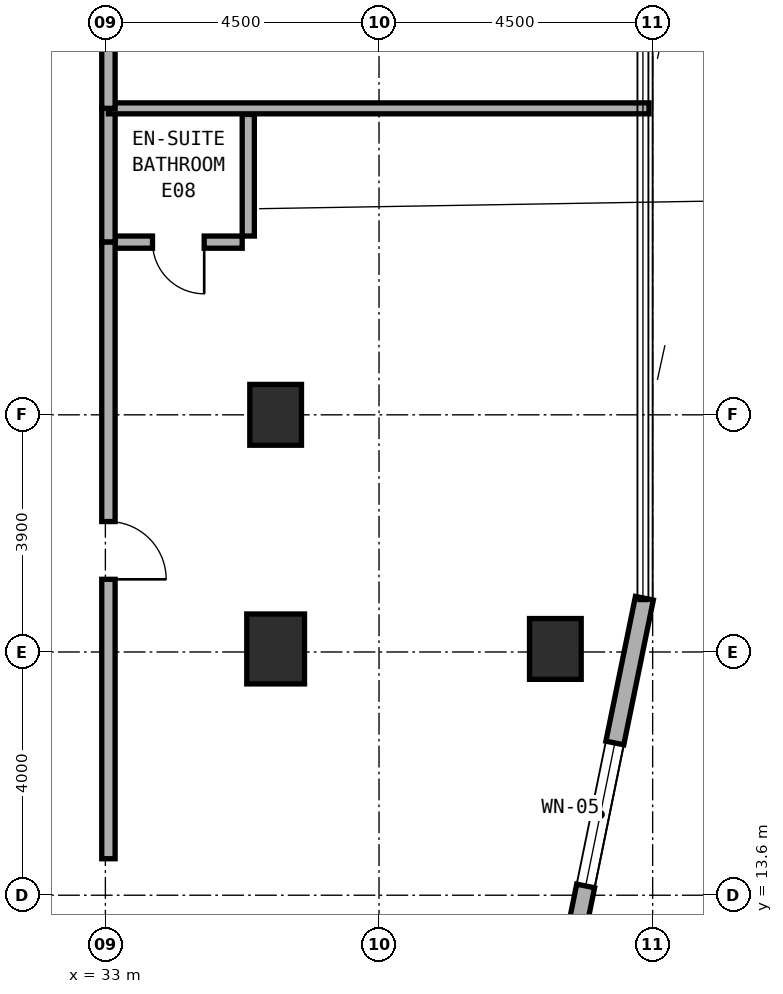
"""IFC4 building model, lengths in metres.
Left out: names, types, materials, properties, quantities, classifications, styles, units other than length and angle.
Written with IfcOpenShell. Run it as: python <this file> out.ifc"""

import sys

from ifc_helpers import new_model, si_unit, direction, frame, frame_2d, origin, origin_2d, place, context, subcontext, project, spatial, rectangle, extrude, element, fill, save


model = new_model("IFC4")
c1 = context("Model", 3, precision=1e-05, world=origin(), true_north=direction((0.0, 1.0)))
c2 = subcontext(c1, "Body", "Model", "MODEL_VIEW")
j1 = project(units=[si_unit("LENGTHUNIT", "METRE"), si_unit("PLANEANGLEUNIT", "RADIAN")], contexts=[c1])
p1 = place(None, origin())
s1 = spatial("IfcSite", under=j1, at=p1, CompositionType="ELEMENT")
p2 = place(p1, origin())
s2 = spatial("IfcBuilding", under=s1, at=p2, CompositionType="ELEMENT")
p3 = place(p2, frame((0.0, 0.0, 83.5)))
s3 = spatial("IfcBuildingStorey", under=s2, at=p3, CompositionType="ELEMENT", Elevation=83.5)
p4 = place(p3, frame((35.8, 21.5, 0.0), z_axis=(0.0, 0.0, 1.0), x_axis=(1.0, 0.0, 0.0)))
e1 = element("IfcColumn", 1, at=p4, inside=s3, PredefinedType="COLUMN", context=c2, shape_type="SweptSolid", body=[
    extrude(rectangle(XDim=0.85, YDim=1.0, at=origin_2d()), origin(), (0.0, 0.0, 1.0), 3.5),
])
p5 = place(p3, frame((35.8, 17.65, 0.0), z_axis=(0.0, 0.0, 1.0), x_axis=(1.0, 0.0, 0.0)))
e2 = element("IfcColumn", 2, at=p5, inside=s3, PredefinedType="COLUMN", context=c2, shape_type="SweptSolid", body=[
    extrude(rectangle(XDim=0.95, YDim=1.15, at=origin_2d()), origin(), (0.0, 0.0, 1.0), 3.5),
])
p6 = place(p3, frame((40.4, 17.65, 0.0), z_axis=(0.0, 0.0, 1.0), x_axis=(1.0, 0.0, 0.0)))
e3 = element("IfcColumn", 3, at=p6, inside=s3, PredefinedType="COLUMN", context=c2, shape_type="SweptSolid", body=[
    extrude(rectangle(XDim=0.85, YDim=1.0, at=origin_2d()), origin(), (0.0, 0.0, 1.0), 3.5),
])
p7 = place(p3, frame((39.851, 8.622, 0.0), z_axis=(0.0, 0.0, 1.0), x_axis=(0.199990901713, 0.979797754249, 0.0)))
e4 = element("IfcWall", 4, at=p7, inside=s3, PredefinedType="STANDARD", context=c2, shape_type="SweptSolid", body=[
    extrude(rectangle(XDim=10.065, YDim=0.3, at=frame_2d((5.033, 0.0))), origin(), (0.0, 0.0, 1.0), 3.22),
])
p8 = place(p7, frame((0.378, 0.0, 0.85)))
e5 = element("IfcOpeningElement", 5, at=p8, cuts=e4, PredefinedType="OPENING", context=c2, shape_type="SweptSolid", body=[
    extrude(rectangle(XDim=1.8, YDim=1.5, at=frame_2d((0.9, 0.75))), frame((0.0, 0.16, 0.0), z_axis=(0.0, -1.0, 0.0), x_axis=(1.0, 0.0, 0.0)), (0.0, 0.0, 1.0), 0.32),
])
p9 = place(p7, frame((5.236, 0.0, 0.8)))
e6 = element("IfcOpeningElement", 6, at=p9, cuts=e4, PredefinedType="OPENING", context=c2, shape_type="SweptSolid", body=[
    extrude(rectangle(XDim=2.4, YDim=1.6, at=frame_2d((1.2, 0.8))), frame((0.0, 0.16, 0.0), z_axis=(0.0, -1.0, 0.0), x_axis=(1.0, 0.0, 0.0)), (0.0, 0.0, 1.0), 0.32),
])
p10 = place(p3, frame((33.15, 24.34, 0.0), z_axis=(0.0, 0.0, 1.0), x_axis=(1.0, 0.0, 0.0)))
e7 = element("IfcWall", 7, at=p10, inside=s3, PredefinedType="PLUMBINGWALL", context=c2, shape_type="SweptSolid", body=[
    extrude(rectangle(XDim=2.1, YDim=0.2, at=frame_2d((1.05, 0.0))), origin(), (0.0, 0.0, 1.0), 3.22),
])
p11 = place(p10, frame((0.625, 0.0, 0.0)))
e8 = element("IfcOpeningElement", 8, at=p11, cuts=e7, PredefinedType="OPENING", context=c2, shape_type="SweptSolid", body=[
    extrude(rectangle(XDim=0.85, YDim=2.1, at=frame_2d((0.425, 1.05))), frame((0.0, 0.11, 0.0), z_axis=(0.0, -1.0, 0.0), x_axis=(1.0, 0.0, 0.0)), (0.0, 0.0, 1.0), 0.22),
])
p12 = place(p3, frame((35.35, 24.44, 0.0), z_axis=(0.0, 0.0, 1.0), x_axis=(0.0, 1.0, 0.0)))
e9 = element("IfcWall", 9, at=p12, inside=s3, PredefinedType="PLUMBINGWALL", context=c2, shape_type="SweptSolid", body=[
    extrude(rectangle(XDim=2.0, YDim=0.2, at=frame_2d((1.0, 0.0))), origin(), (0.0, 0.0, 1.0), 3.22),
])
p13 = place(p3, frame((33.05, 24.34, 0.0), z_axis=(0.0, 0.0, 1.0), x_axis=(0.0, 1.0, 0.0)))
e10 = element("IfcWall", 10, at=p13, inside=s3, PredefinedType="SOLIDWALL", context=c2, shape_type="SweptSolid", body=[
    extrude(rectangle(XDim=2.2, YDim=0.22, at=frame_2d((1.1, 0.0))), origin(), (0.0, 0.0, 1.0), 3.22),
])
p14 = place(p3, frame((33.05, 14.2, 0.0), z_axis=(0.0, 0.0, 1.0), x_axis=(0.0, 1.0, 0.0)))
e11 = element("IfcWall", 11, at=p14, inside=s3, PredefinedType="SOLIDWALL", context=c2, shape_type="SweptSolid", body=[
    extrude(rectangle(XDim=10.14, YDim=0.22, at=frame_2d((5.07, 0.0))), origin(), (0.0, 0.0, 1.0), 2.595),
])
p15 = place(p14, frame((4.595, 0.0, 0.0)))
e12 = element("IfcOpeningElement", 12, at=p15, cuts=e11, PredefinedType="OPENING", context=c2, shape_type="SweptSolid", body=[
    extrude(rectangle(XDim=0.95, YDim=2.1, at=frame_2d((0.475, 1.05))), frame((0.0, 0.12, 0.0), z_axis=(0.0, -1.0, 0.0), x_axis=(1.0, 0.0, 0.0)), (0.0, 0.0, 1.0), 0.24),
])
p16 = place(p3, frame((33.05, 26.54, 0.0), z_axis=(0.0, 0.0, 1.0), x_axis=(1.0, 0.0, 0.0)))
e13 = element("IfcWall", 13, at=p16, inside=s3, PredefinedType="SOLIDWALL", context=c2, shape_type="SweptSolid", body=[
    extrude(rectangle(XDim=8.89, YDim=0.18, at=frame_2d((4.445, 0.0))), origin(), (0.0, 0.0, 1.0), 2.745),
])
p17 = place(p3, frame((33.05, 26.54, 0.0), z_axis=(0.0, 0.0, 1.0), x_axis=(0.0, 1.0, 0.0)))
e14 = element("IfcWall", 14, at=p17, inside=s3, PredefinedType="SOLIDWALL", context=c2, shape_type="SweptSolid", body=[
    extrude(rectangle(XDim=7.06, YDim=0.22, at=frame_2d((3.53, 0.0))), origin(), (0.0, 0.0, 1.0), 2.595),
])
p18 = place(p17, frame((3.055, 0.0, 0.0)))
e15 = element("IfcOpeningElement", 15, at=p18, cuts=e14, PredefinedType="OPENING", context=c2, shape_type="SweptSolid", body=[
    extrude(rectangle(XDim=0.95, YDim=2.1, at=frame_2d((0.475, 1.05))), frame((0.0, 0.12, 0.0), z_axis=(0.0, -1.0, 0.0), x_axis=(1.0, 0.0, 0.0)), (0.0, 0.0, 1.0), 0.24),
])
p19 = place(p9, origin())
e16 = element("IfcWindow", 16, at=p19, inside=s3, PartitioningType="SINGLE_PANEL", PredefinedType="WINDOW", context=c2, shape_type="SweptSolid", body=[
    extrude(rectangle(XDim=2.4, YDim=1.6, at=frame_2d((1.2, 0.8))), frame((0.0, 0.03, 0.0), z_axis=(0.0, -1.0, 0.0), x_axis=(1.0, 0.0, 0.0)), (0.0, 0.0, 1.0), 0.06),
])
fill(e6, e16)
p20 = place(p11, frame((0.85, 0.0, 0.0), z_axis=(0.0, 0.0, 1.0), x_axis=(-1.0, 0.0, 0.0)))
e17 = element("IfcDoor", 17, at=p20, inside=s3, OperationType="SINGLE_SWING_LEFT", PredefinedType="DOOR", context=c2, shape_type="SweptSolid", body=[
    extrude(rectangle(XDim=0.85, YDim=2.1, at=frame_2d((0.425, 1.05))), frame((0.0, 0.025, 0.0), z_axis=(0.0, -1.0, 0.0), x_axis=(1.0, 0.0, 0.0)), (0.0, 0.0, 1.0), 0.05),
])
fill(e8, e17)
p21 = place(p15, frame((0.95, 0.0, 0.0), z_axis=(0.0, 0.0, 1.0), x_axis=(-1.0, 0.0, 0.0)))
e18 = element("IfcDoor", 18, at=p21, inside=s3, OperationType="SINGLE_SWING_RIGHT", PredefinedType="DOOR", context=c2, shape_type="SweptSolid", body=[
    extrude(rectangle(XDim=0.95, YDim=2.1, at=frame_2d((0.475, 1.05))), frame((0.0, 0.025, 0.0), z_axis=(0.0, -1.0, 0.0), x_axis=(1.0, 0.0, 0.0)), (0.0, 0.0, 1.0), 0.05),
])
fill(e12, e18)
save(model, sys.argv[1])
